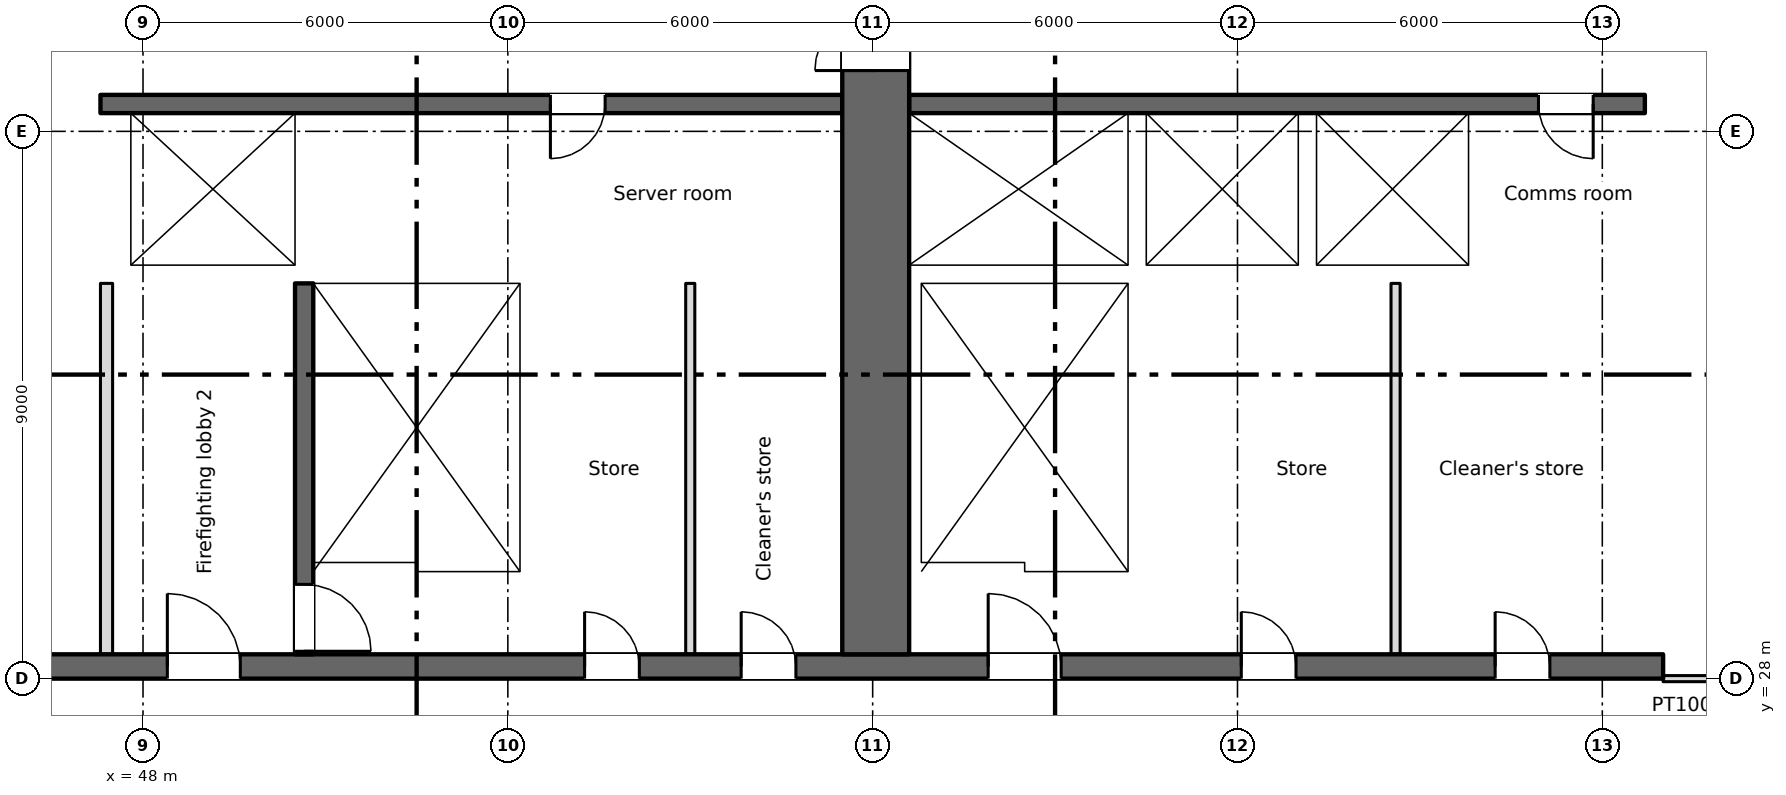
"""IFC4 building model, lengths in metres.
Left out: names, types, materials, properties, quantities, classifications, styles, units other than length and angle.
Written with IfcOpenShell. Run it as: python <this file> out.ifc"""

import sys

from ifc_helpers import new_model, si_unit, direction, frame, frame_2d, origin, place, context, subcontext, project, spatial, rectangle, extrude, element, fill, save


model = new_model("IFC4")
c1 = context("Model", 3, precision=1e-05, world=origin(), true_north=direction((0.0, 1.0)))
c2 = subcontext(c1, "Body", "Model", "MODEL_VIEW")
j1 = project(units=[si_unit("LENGTHUNIT", "METRE"), si_unit("PLANEANGLEUNIT", "RADIAN")], contexts=[c1])
p1 = place(None, origin())
s1 = spatial("IfcSite", under=j1, at=p1, CompositionType="ELEMENT")
p2 = place(p1, origin())
s2 = spatial("IfcBuilding", under=s1, at=p2, CompositionType="ELEMENT")
p3 = place(p2, frame((0.0, 0.0, 11.3)))
s3 = spatial("IfcBuildingStorey", under=s2, at=p3, CompositionType="ELEMENT", Elevation=11.3)
p4 = place(p3, frame((6.7, 28.2, 0.0), z_axis=(0.0, 0.0, 1.0), x_axis=(1.0, 0.0, 0.0)))
e1 = element("IfcWall", 1, at=p4, inside=s3, PredefinedType="SHEAR", context=c2, shape_type="SweptSolid", body=[
    extrude(rectangle(XDim=66.3, YDim=0.4, at=frame_2d((33.15, 0.0))), origin(), (0.0, 0.0, 1.0), 6.1),
])
p5 = place(p4, frame((13.85, 0.0, 0.0)))
e2 = element("IfcOpeningElement", 2, at=p5, cuts=e1, PredefinedType="OPENING", context=c2, shape_type="SweptSolid", body=[
    extrude(rectangle(XDim=0.9, YDim=2.1, at=frame_2d((0.45, 1.05))), frame((0.0, 0.21, 0.0), z_axis=(0.0, -1.0, 0.0), x_axis=(1.0, 0.0, 0.0)), (0.0, 0.0, 1.0), 0.42),
])
p6 = place(p4, frame((48.562, 0.0, 0.0)))
e3 = element("IfcOpeningElement", 3, at=p6, cuts=e1, PredefinedType="OPENING", context=c2, shape_type="SweptSolid", body=[
    extrude(rectangle(XDim=0.9, YDim=2.1, at=frame_2d((0.45, 1.05))), frame((0.0, 0.21, 0.0), z_axis=(0.0, -1.0, 0.0), x_axis=(1.0, 0.0, 0.0)), (0.0, 0.0, 1.0), 0.42),
])
p7 = place(p4, frame((51.137, 0.0, 0.0)))
e4 = element("IfcOpeningElement", 4, at=p7, cuts=e1, PredefinedType="OPENING", context=c2, shape_type="SweptSolid", body=[
    extrude(rectangle(XDim=0.9, YDim=2.1, at=frame_2d((0.45, 1.05))), frame((0.0, 0.21, 0.0), z_axis=(0.0, -1.0, 0.0), x_axis=(1.0, 0.0, 0.0)), (0.0, 0.0, 1.0), 0.42),
])
p8 = place(p4, frame((1.35, 0.0, 0.0)))
e5 = element("IfcOpeningElement", 5, at=p8, cuts=e1, PredefinedType="OPENING", context=c2, shape_type="SweptSolid", body=[
    extrude(rectangle(XDim=0.9, YDim=2.1, at=frame_2d((0.45, 1.05))), frame((0.0, 0.21, 0.0), z_axis=(0.0, -1.0, 0.0), x_axis=(1.0, 0.0, 0.0)), (0.0, 0.0, 1.0), 0.42),
])
p9 = place(p4, frame((59.363, 0.0, 0.0)))
e6 = element("IfcOpeningElement", 6, at=p9, cuts=e1, PredefinedType="OPENING", context=c2, shape_type="SweptSolid", body=[
    extrude(rectangle(XDim=0.9, YDim=2.1, at=frame_2d((0.45, 1.05))), frame((0.0, 0.21, 0.0), z_axis=(0.0, -1.0, 0.0), x_axis=(1.0, 0.0, 0.0)), (0.0, 0.0, 1.0), 0.42),
])
p10 = place(p4, frame((63.538, 0.0, 0.0)))
e7 = element("IfcOpeningElement", 7, at=p10, cuts=e1, PredefinedType="OPENING", context=c2, shape_type="SweptSolid", body=[
    extrude(rectangle(XDim=0.9, YDim=2.1, at=frame_2d((0.45, 1.05))), frame((0.0, 0.21, 0.0), z_axis=(0.0, -1.0, 0.0), x_axis=(1.0, 0.0, 0.0)), (0.0, 0.0, 1.0), 0.42),
])
p11 = place(p4, frame((4.7, 0.0, 0.0)))
e8 = element("IfcOpeningElement", 8, at=p11, cuts=e1, PredefinedType="OPENING", context=c2, shape_type="SweptSolid", body=[
    extrude(rectangle(XDim=1.2, YDim=2.1, at=frame_2d((0.6, 1.05))), frame((0.0, 0.21, 0.0), z_axis=(0.0, -1.0, 0.0), x_axis=(1.0, 0.0, 0.0)), (0.0, 0.0, 1.0), 0.42),
])
p12 = place(p4, frame((31.7, 0.0, 0.0)))
e9 = element("IfcOpeningElement", 9, at=p12, cuts=e1, PredefinedType="OPENING", context=c2, shape_type="SweptSolid", body=[
    extrude(rectangle(XDim=1.2, YDim=2.1, at=frame_2d((0.6, 1.05))), frame((0.0, 0.21, 0.0), z_axis=(0.0, -1.0, 0.0), x_axis=(1.0, 0.0, 0.0)), (0.0, 0.0, 1.0), 0.42),
])
p13 = place(p4, frame((55.2, 0.0, 0.0)))
e10 = element("IfcOpeningElement", 10, at=p13, cuts=e1, PredefinedType="OPENING", context=c2, shape_type="SweptSolid", body=[
    extrude(rectangle(XDim=1.2, YDim=2.1, at=frame_2d((0.6, 1.05))), frame((0.0, 0.21, 0.0), z_axis=(0.0, -1.0, 0.0), x_axis=(1.0, 0.0, 0.0)), (0.0, 0.0, 1.0), 0.42),
])
p14 = place(p4, frame((21.7, 0.0, 0.0)))
e11 = element("IfcOpeningElement", 11, at=p14, cuts=e1, PredefinedType="OPENING", context=c2, shape_type="SweptSolid", body=[
    extrude(rectangle(XDim=1.2, YDim=2.1, at=frame_2d((0.6, 1.05))), frame((0.0, 0.21, 0.0), z_axis=(0.0, -1.0, 0.0), x_axis=(1.0, 0.0, 0.0)), (0.0, 0.0, 1.0), 0.42),
])
p15 = place(p4, frame((41.7, 0.0, 0.0)))
e12 = element("IfcOpeningElement", 12, at=p15, cuts=e1, PredefinedType="OPENING", context=c2, shape_type="SweptSolid", body=[
    extrude(rectangle(XDim=1.2, YDim=2.1, at=frame_2d((0.6, 1.05))), frame((0.0, 0.21, 0.0), z_axis=(0.0, -1.0, 0.0), x_axis=(1.0, 0.0, 0.0)), (0.0, 0.0, 1.0), 0.42),
])
p16 = place(p4, frame((24.85, 0.0, 0.0)))
e13 = element("IfcOpeningElement", 13, at=p16, cuts=e1, PredefinedType="OPENING", context=c2, shape_type="SweptSolid", body=[
    extrude(rectangle(XDim=2.4, YDim=2.1, at=frame_2d((1.2, 1.05))), frame((0.0, 0.21, 0.0), z_axis=(0.0, -1.0, 0.0), x_axis=(1.0, 0.0, 0.0)), (0.0, 0.0, 1.0), 0.42),
])
p17 = place(p4, frame((37.35, 0.0, 0.0)))
e14 = element("IfcOpeningElement", 14, at=p17, cuts=e1, PredefinedType="OPENING", context=c2, shape_type="SweptSolid", body=[
    extrude(rectangle(XDim=2.4, YDim=2.1, at=frame_2d((1.2, 1.05))), frame((0.0, 0.21, 0.0), z_axis=(0.0, -1.0, 0.0), x_axis=(1.0, 0.0, 0.0)), (0.0, 0.0, 1.0), 0.42),
])
p18 = place(p4, frame((7.8, 0.0, 0.0)))
e15 = element("IfcOpeningElement", 15, at=p18, cuts=e1, PredefinedType="OPENING", context=c2, shape_type="SweptSolid", body=[
    extrude(rectangle(XDim=2.4, YDim=2.1, at=frame_2d((1.2, 1.05))), frame((0.0, 0.21, 0.0), z_axis=(0.0, -1.0, 0.0), x_axis=(1.0, 0.0, 0.0)), (0.0, 0.0, 1.0), 0.42),
])
p19 = place(p4, frame((28.85, 0.0, 0.0)))
e16 = element("IfcOpeningElement", 16, at=p19, cuts=e1, PredefinedType="OPENING", context=c2, shape_type="SweptSolid", body=[
    extrude(rectangle(XDim=0.9, YDim=2.1, at=frame_2d((0.45, 1.05))), frame((0.0, 0.21, 0.0), z_axis=(0.0, -1.0, 0.0), x_axis=(1.0, 0.0, 0.0)), (0.0, 0.0, 1.0), 0.42),
])
p20 = place(p4, frame((34.85, 0.0, 0.0)))
e17 = element("IfcOpeningElement", 17, at=p20, cuts=e1, PredefinedType="OPENING", context=c2, shape_type="SweptSolid", body=[
    extrude(rectangle(XDim=0.9, YDim=2.1, at=frame_2d((0.45, 1.05))), frame((0.0, 0.21, 0.0), z_axis=(0.0, -1.0, 0.0), x_axis=(1.0, 0.0, 0.0)), (0.0, 0.0, 1.0), 0.42),
])
p21 = place(p3, frame((72.85, 28.4, 0.0), z_axis=(0.0, 0.0, 1.0), x_axis=(0.0, 1.0, 0.0)))
e18 = element("IfcWall", 18, at=p21, inside=s3, PredefinedType="SHEAR", context=c2, shape_type="SweptSolid", body=[
    extrude(rectangle(XDim=12.85, YDim=0.3, at=frame_2d((6.425, 0.0))), origin(), (0.0, 0.0, 1.0), 6.1),
])
p22 = place(p3, frame((64.35, 34.8, 0.0), z_axis=(0.0, 0.0, 1.0), x_axis=(0.0, 1.0, 0.0)))
e19 = element("IfcWall", 19, at=p22, inside=s3, PredefinedType="SHEAR", context=c2, shape_type="SweptSolid", body=[
    extrude(rectangle(XDim=2.5, YDim=0.3, at=frame_2d((1.25, 0.0))), origin(), (0.0, 0.0, 1.0), 6.1),
])
p23 = place(p3, frame((60.05, 28.4, 0.0), z_axis=(0.0, 0.0, 1.0), x_axis=(0.0, 1.0, 0.0)))
e20 = element("IfcWall", 20, at=p23, inside=s3, PredefinedType="SHEAR", context=c2, shape_type="SweptSolid", body=[
    extrude(rectangle(XDim=16.5, YDim=1.1, at=frame_2d((8.25, 0.0))), origin(), (0.0, 0.0, 1.0), 6.1),
])
p24 = place(p23, frame((9.6, 0.0, 0.0)))
e21 = element("IfcOpeningElement", 21, at=p24, cuts=e20, PredefinedType="OPENING", context=c2, shape_type="SweptSolid", body=[
    extrude(rectangle(XDim=2.0, YDim=2.1, at=frame_2d((1.0, 1.05))), frame((0.0, 0.56, 0.0), z_axis=(0.0, -1.0, 0.0), x_axis=(1.0, 0.0, 0.0)), (0.0, 0.0, 1.0), 1.12),
])
p25 = place(p23, frame((15.2, 0.0, 0.0)))
e22 = element("IfcOpeningElement", 22, at=p25, cuts=e20, PredefinedType="OPENING", context=c2, shape_type="SweptSolid", body=[
    extrude(rectangle(XDim=1.2, YDim=2.1, at=frame_2d((0.6, 1.05))), frame((0.0, 0.56, 0.0), z_axis=(0.0, -1.0, 0.0), x_axis=(1.0, 0.0, 0.0)), (0.0, 0.0, 1.0), 1.12),
])
p26 = place(p3, frame((50.65, 34.5, 0.0), z_axis=(0.0, 0.0, 1.0), x_axis=(0.0, -1.0, 0.0)))
e23 = element("IfcWall", 23, at=p26, inside=s3, PredefinedType="SHEAR", context=c2, shape_type="SweptSolid", body=[
    extrude(rectangle(XDim=6.1, YDim=0.3, at=frame_2d((3.05, 0.0))), origin(), (0.0, 0.0, 1.0), 6.1),
])
p27 = place(p26, frame((4.95, 0.0, 0.0)))
e24 = element("IfcOpeningElement", 24, at=p27, cuts=e23, PredefinedType="OPENING", context=c2, shape_type="SweptSolid", body=[
    extrude(rectangle(XDim=1.1, YDim=2.1, at=frame_2d((0.55, 1.05))), frame((0.0, 0.16, 0.0), z_axis=(0.0, -1.0, 0.0), x_axis=(1.0, 0.0, 0.0)), (0.0, 0.0, 1.0), 0.32),
])
p28 = place(p3, frame((54.35, 28.4, 0.0), z_axis=(0.0, 0.0, 1.0), x_axis=(0.0, 1.0, 0.0)))
e25 = element("IfcWall", 25, at=p28, inside=s3, PredefinedType="SHEAR", context=c2, shape_type="SweptSolid", body=[
    extrude(rectangle(XDim=6.1, YDim=0.3, at=frame_2d((3.05, 0.0))), origin(), (0.0, 0.0, 1.0), 6.1),
])
p29 = place(p3, frame((60.7, 28.4, 0.0), z_axis=(0.0, 0.0, 1.0), x_axis=(0.0, 1.0, 0.0)))
e26 = element("IfcWall", 26, at=p29, inside=s3, PredefinedType="SHEAR", context=c2, shape_type="SweptSolid", body=[
    extrude(rectangle(XDim=6.1, YDim=0.2, at=frame_2d((3.05, 0.0))), origin(), (0.0, 0.0, 1.0), 6.1),
])
p30 = place(p3, frame((64.35, 28.4, 0.0), z_axis=(0.0, 0.0, 1.0), x_axis=(0.0, 1.0, 0.0)))
e27 = element("IfcWall", 27, at=p30, inside=s3, PredefinedType="SHEAR", context=c2, shape_type="SweptSolid", body=[
    extrude(rectangle(XDim=6.1, YDim=0.3, at=frame_2d((3.05, 0.0))), origin(), (0.0, 0.0, 1.0), 6.1),
])
p31 = place(p3, frame((47.3, 34.65, 0.0), z_axis=(0.0, 0.0, 1.0), x_axis=(1.0, 0.0, 0.0)))
e28 = element("IfcWall", 28, at=p31, inside=s3, PredefinedType="SHEAR", context=c2, shape_type="SweptSolid", body=[
    extrude(rectangle(XDim=12.2, YDim=0.3, at=frame_2d((6.1, 0.0))), origin(), (0.0, 0.0, 1.0), 6.1),
])
p32 = place(p31, frame((1.3, 0.0, 0.0)))
e29 = element("IfcOpeningElement", 29, at=p32, cuts=e28, PredefinedType="OPENING", context=c2, shape_type="SweptSolid", body=[
    extrude(rectangle(XDim=1.1, YDim=2.1, at=frame_2d((0.55, 1.05))), frame((0.0, 0.16, 0.0), z_axis=(0.0, -1.0, 0.0), x_axis=(1.0, 0.0, 0.0)), (0.0, 0.0, 1.0), 0.32),
])
p33 = place(p3, frame((60.6, 34.65, 0.0), z_axis=(0.0, 0.0, 1.0), x_axis=(1.0, 0.0, 0.0)))
e30 = element("IfcWall", 30, at=p33, inside=s3, PredefinedType="SHEAR", context=c2, shape_type="SweptSolid", body=[
    extrude(rectangle(XDim=12.1, YDim=0.3, at=frame_2d((6.05, 0.0))), origin(), (0.0, 0.0, 1.0), 6.1),
])
p34 = place(p3, frame((59.5, 37.45, 0.0), z_axis=(0.0, 0.0, 1.0), x_axis=(-1.0, 0.0, 0.0)))
e31 = element("IfcWall", 31, at=p34, inside=s3, PredefinedType="SHEAR", context=c2, shape_type="SweptSolid", body=[
    extrude(rectangle(XDim=12.2, YDim=0.3, at=frame_2d((6.1, 0.0))), origin(), (0.0, 0.0, 1.0), 6.1),
])
p35 = place(p34, frame((3.9, 0.0, 0.0)))
e32 = element("IfcOpeningElement", 32, at=p35, cuts=e31, PredefinedType="OPENING", context=c2, shape_type="SweptSolid", body=[
    extrude(rectangle(XDim=0.9, YDim=2.1, at=frame_2d((0.45, 1.05))), frame((0.0, 0.16, 0.0), z_axis=(0.0, -1.0, 0.0), x_axis=(1.0, 0.0, 0.0)), (0.0, 0.0, 1.0), 0.32),
])
p36 = place(p3, frame((72.7, 37.45, 0.0), z_axis=(0.0, 0.0, 1.0), x_axis=(-1.0, 0.0, 0.0)))
e33 = element("IfcWall", 33, at=p36, inside=s3, PredefinedType="SHEAR", context=c2, shape_type="SweptSolid", body=[
    extrude(rectangle(XDim=12.1, YDim=0.3, at=frame_2d((6.05, 0.0))), origin(), (0.0, 0.0, 1.0), 6.1),
])
p37 = place(p36, frame((0.85, 0.0, 0.0)))
e34 = element("IfcOpeningElement", 34, at=p37, cuts=e33, PredefinedType="OPENING", context=c2, shape_type="SweptSolid", body=[
    extrude(rectangle(XDim=0.9, YDim=2.1, at=frame_2d((0.45, 1.05))), frame((0.0, 0.16, 0.0), z_axis=(0.0, -1.0, 0.0), x_axis=(1.0, 0.0, 0.0)), (0.0, 0.0, 1.0), 0.32),
])
p38 = place(p36, frame((9.75, 0.0, 0.0)))
e35 = element("IfcOpeningElement", 35, at=p38, cuts=e33, PredefinedType="OPENING", context=c2, shape_type="SweptSolid", body=[
    extrude(rectangle(XDim=1.1, YDim=2.1, at=frame_2d((0.55, 1.05))), frame((0.0, 0.16, 0.0), z_axis=(0.0, -1.0, 0.0), x_axis=(1.0, 0.0, 0.0)), (0.0, 0.0, 1.0), 0.32),
])
p39 = place(p36, frame((6.4, 0.0, 0.0)))
e36 = element("IfcOpeningElement", 36, at=p39, cuts=e33, PredefinedType="OPENING", context=c2, shape_type="SweptSolid", body=[
    extrude(rectangle(XDim=1.1, YDim=2.1, at=frame_2d((0.55, 1.05))), frame((0.0, 0.16, 0.0), z_axis=(0.0, -1.0, 0.0), x_axis=(1.0, 0.0, 0.0)), (0.0, 0.0, 1.0), 0.32),
])
p40 = place(p36, frame((3.6, 0.0, 0.0)))
e37 = element("IfcOpeningElement", 37, at=p40, cuts=e33, PredefinedType="OPENING", context=c2, shape_type="SweptSolid", body=[
    extrude(rectangle(XDim=1.1, YDim=2.1, at=frame_2d((0.55, 1.05))), frame((0.0, 0.16, 0.0), z_axis=(0.0, -1.0, 0.0), x_axis=(1.0, 0.0, 0.0)), (0.0, 0.0, 1.0), 0.32),
])
p41 = place(p3, frame((47.55, 34.8, 0.0), z_axis=(0.0, 0.0, 1.0), x_axis=(0.0, 1.0, 0.0)))
e38 = element("IfcWall", 38, at=p41, inside=s3, PredefinedType="SHEAR", context=c2, shape_type="SweptSolid", body=[
    extrude(rectangle(XDim=2.5, YDim=0.5, at=frame_2d((1.25, 0.0))), origin(), (0.0, 0.0, 1.0), 6.1),
])
for number, where, z_axis, x_axis in (
    (39, (50.65, 34.8, 0.0), (0.0, 0.0, 1.0), (0.0, 1.0, 0.0)),
    (40, (67.15, 34.8, 0.0), (0.0, 0.0, 1.0), (0.0, 1.0, 0.0)),
    (41, (69.95, 34.8, 0.0), (0.0, 0.0, 1.0), (0.0, 1.0, 0.0)),
):
    element("IfcWall", number, at=place(p3, frame(where, z_axis=z_axis, x_axis=x_axis)), inside=s3, PredefinedType="SHEAR", context=c2, shape_type="SweptSolid", body=[
        extrude(rectangle(XDim=2.5, YDim=0.3, at=frame_2d((1.25, 0.0))), origin(), (0.0, 0.0, 1.0), 6.1),
    ])
p42 = place(p3, frame((47.4, 28.4, 0.0), z_axis=(0.0, 0.0, 1.0), x_axis=(0.0, 1.0, 0.0)))
e42 = element("IfcWall", 42, at=p42, inside=s3, PredefinedType="PARTITIONING", context=c2, shape_type="SweptSolid", body=[
    extrude(rectangle(XDim=6.1, YDim=0.2, at=frame_2d((3.05, 0.0))), origin(), (0.0, 0.0, 1.0), 6.1),
])
for number, where, z_axis, x_axis in (
    (43, (57.0, 28.4, 0.0), (0.0, 0.0, 1.0), (0.0, 1.0, 0.0)),
    (44, (68.6, 28.4, 0.0), (0.0, 0.0, 1.0), (0.0, 1.0, 0.0)),
):
    element("IfcWall", number, at=place(p3, frame(where, z_axis=z_axis, x_axis=x_axis)), inside=s3, PredefinedType="PARTITIONING", context=c2, shape_type="SweptSolid", body=[
        extrude(rectangle(XDim=6.1, YDim=0.15, at=frame_2d((3.05, 0.0))), origin(), (0.0, 0.0, 1.0), 6.1),
    ])
p43 = place(p3, frame((73.0, 28.0, 0.0), z_axis=(0.0, 0.0, 1.0), x_axis=(1.0, 0.0, 0.0)))
e45 = element("IfcWall", 45, at=p43, inside=s3, PredefinedType="PARTITIONING", context=c2, shape_type="SweptSolid", body=[
    extrude(rectangle(XDim=4.2, YDim=0.1, at=frame_2d((2.1, 0.0))), origin(), (0.0, 0.0, 1.0), 6.1),
])
p44 = place(p43, frame((1.6, 0.0, 0.0)))
e46 = element("IfcOpeningElement", 46, at=p44, cuts=e45, PredefinedType="OPENING", context=c2, shape_type="SweptSolid", body=[
    extrude(rectangle(XDim=1.0, YDim=2.1, at=frame_2d((0.5, 1.05))), frame((0.0, 0.06, 0.0), z_axis=(0.0, -1.0, 0.0), x_axis=(1.0, 0.0, 0.0)), (0.0, 0.0, 1.0), 0.12),
])
p45 = place(p6, origin())
e47 = element("IfcDoor", 47, at=p45, inside=s3, OperationType="SINGLE_SWING_LEFT", PredefinedType="DOOR", context=c2, shape_type="SweptSolid", body=[
    extrude(rectangle(XDim=0.9, YDim=2.1, at=frame_2d((0.45, 1.05))), frame((0.0, 0.025, 0.0), z_axis=(0.0, -1.0, 0.0), x_axis=(1.0, 0.0, 0.0)), (0.0, 0.0, 1.0), 0.05),
])
fill(e3, e47)
p46 = place(p7, origin())
e48 = element("IfcDoor", 48, at=p46, inside=s3, OperationType="SINGLE_SWING_LEFT", PredefinedType="DOOR", context=c2, shape_type="SweptSolid", body=[
    extrude(rectangle(XDim=0.9, YDim=2.1, at=frame_2d((0.45, 1.05))), frame((0.0, 0.025, 0.0), z_axis=(0.0, -1.0, 0.0), x_axis=(1.0, 0.0, 0.0)), (0.0, 0.0, 1.0), 0.05),
])
fill(e4, e48)
p47 = place(p9, origin())
e49 = element("IfcDoor", 49, at=p47, inside=s3, OperationType="SINGLE_SWING_LEFT", PredefinedType="DOOR", context=c2, shape_type="SweptSolid", body=[
    extrude(rectangle(XDim=0.9, YDim=2.1, at=frame_2d((0.45, 1.05))), frame((0.0, 0.025, 0.0), z_axis=(0.0, -1.0, 0.0), x_axis=(1.0, 0.0, 0.0)), (0.0, 0.0, 1.0), 0.05),
])
fill(e6, e49)
p48 = place(p10, origin())
e50 = element("IfcDoor", 50, at=p48, inside=s3, OperationType="SINGLE_SWING_LEFT", PredefinedType="DOOR", context=c2, shape_type="SweptSolid", body=[
    extrude(rectangle(XDim=0.9, YDim=2.1, at=frame_2d((0.45, 1.05))), frame((0.0, 0.025, 0.0), z_axis=(0.0, -1.0, 0.0), x_axis=(1.0, 0.0, 0.0)), (0.0, 0.0, 1.0), 0.05),
])
fill(e7, e50)
p49 = place(p35, origin())
e51 = element("IfcDoor", 51, at=p49, inside=s3, OperationType="SINGLE_SWING_RIGHT", PredefinedType="DOOR", context=c2, shape_type="SweptSolid", body=[
    extrude(rectangle(XDim=0.9, YDim=2.1, at=frame_2d((0.45, 1.05))), frame((0.0, 0.025, 0.0), z_axis=(0.0, -1.0, 0.0), x_axis=(1.0, 0.0, 0.0)), (0.0, 0.0, 1.0), 0.05),
])
fill(e32, e51)
p50 = place(p37, origin())
e52 = element("IfcDoor", 52, at=p50, inside=s3, OperationType="SINGLE_SWING_LEFT", PredefinedType="DOOR", context=c2, shape_type="SweptSolid", body=[
    extrude(rectangle(XDim=0.9, YDim=2.1, at=frame_2d((0.45, 1.05))), frame((0.0, 0.025, 0.0), z_axis=(0.0, -1.0, 0.0), x_axis=(1.0, 0.0, 0.0)), (0.0, 0.0, 1.0), 0.05),
])
fill(e34, e52)
p51 = place(p38, origin())
e53 = element("IfcDoor", 53, at=p51, inside=s3, OperationType="SLIDING_TO_LEFT", PredefinedType="DOOR", context=c2, shape_type="SweptSolid", body=[
    extrude(rectangle(XDim=1.1, YDim=2.1, at=frame_2d((0.55, 1.05))), frame((0.0, 0.025, 0.0), z_axis=(0.0, -1.0, 0.0), x_axis=(1.0, 0.0, 0.0)), (0.0, 0.0, 1.0), 0.05),
])
fill(e35, e53)
p52 = place(p39, origin())
e54 = element("IfcDoor", 54, at=p52, inside=s3, OperationType="SLIDING_TO_LEFT", PredefinedType="DOOR", context=c2, shape_type="SweptSolid", body=[
    extrude(rectangle(XDim=1.1, YDim=2.1, at=frame_2d((0.55, 1.05))), frame((0.0, 0.025, 0.0), z_axis=(0.0, -1.0, 0.0), x_axis=(1.0, 0.0, 0.0)), (0.0, 0.0, 1.0), 0.05),
])
fill(e36, e54)
p53 = place(p40, origin())
e55 = element("IfcDoor", 55, at=p53, inside=s3, OperationType="SLIDING_TO_LEFT", PredefinedType="DOOR", context=c2, shape_type="SweptSolid", body=[
    extrude(rectangle(XDim=1.1, YDim=2.1, at=frame_2d((0.55, 1.05))), frame((0.0, 0.025, 0.0), z_axis=(0.0, -1.0, 0.0), x_axis=(1.0, 0.0, 0.0)), (0.0, 0.0, 1.0), 0.05),
])
fill(e37, e55)
p54 = place(p32, origin())
e56 = element("IfcDoor", 56, at=p54, inside=s3, OperationType="SLIDING_TO_LEFT", PredefinedType="DOOR", context=c2, shape_type="SweptSolid", body=[
    extrude(rectangle(XDim=1.1, YDim=2.1, at=frame_2d((0.55, 1.05))), frame((0.0, 0.025, 0.0), z_axis=(0.0, -1.0, 0.0), x_axis=(1.0, 0.0, 0.0)), (0.0, 0.0, 1.0), 0.05),
])
fill(e29, e56)
p55 = place(p27, origin())
e57 = element("IfcDoor", 57, at=p55, inside=s3, OperationType="SINGLE_SWING_RIGHT", PredefinedType="DOOR", context=c2, shape_type="SweptSolid", body=[
    extrude(rectangle(XDim=1.1, YDim=2.1, at=frame_2d((0.55, 1.05))), frame((0.0, 0.025, 0.0), z_axis=(0.0, -1.0, 0.0), x_axis=(1.0, 0.0, 0.0)), (0.0, 0.0, 1.0), 0.05),
])
fill(e24, e57)
p56 = place(p13, origin())
e58 = element("IfcDoor", 58, at=p56, inside=s3, OperationType="SINGLE_SWING_LEFT", PredefinedType="DOOR", context=c2, shape_type="SweptSolid", body=[
    extrude(rectangle(XDim=1.2, YDim=2.1, at=frame_2d((0.6, 1.05))), frame((0.0, 0.025, 0.0), z_axis=(0.0, -1.0, 0.0), x_axis=(1.0, 0.0, 0.0)), (0.0, 0.0, 1.0), 0.05),
])
fill(e10, e58)
p57 = place(p15, origin())
e59 = element("IfcDoor", 59, at=p57, inside=s3, OperationType="SINGLE_SWING_LEFT", PredefinedType="DOOR", context=c2, shape_type="SweptSolid", body=[
    extrude(rectangle(XDim=1.2, YDim=2.1, at=frame_2d((0.6, 1.05))), frame((0.0, 0.025, 0.0), z_axis=(0.0, -1.0, 0.0), x_axis=(1.0, 0.0, 0.0)), (0.0, 0.0, 1.0), 0.05),
])
fill(e12, e59)
p58 = place(p24, origin())
e60 = element("IfcDoor", 60, at=p58, inside=s3, OperationType="DOUBLE_DOOR_SINGLE_SWING", PredefinedType="DOOR", context=c2, shape_type="SweptSolid", body=[
    extrude(rectangle(XDim=2.0, YDim=2.1, at=frame_2d((1.0, 1.05))), frame((0.0, 0.025, 0.0), z_axis=(0.0, -1.0, 0.0), x_axis=(1.0, 0.0, 0.0)), (0.0, 0.0, 1.0), 0.05),
])
fill(e21, e60)
save(model, sys.argv[1])
